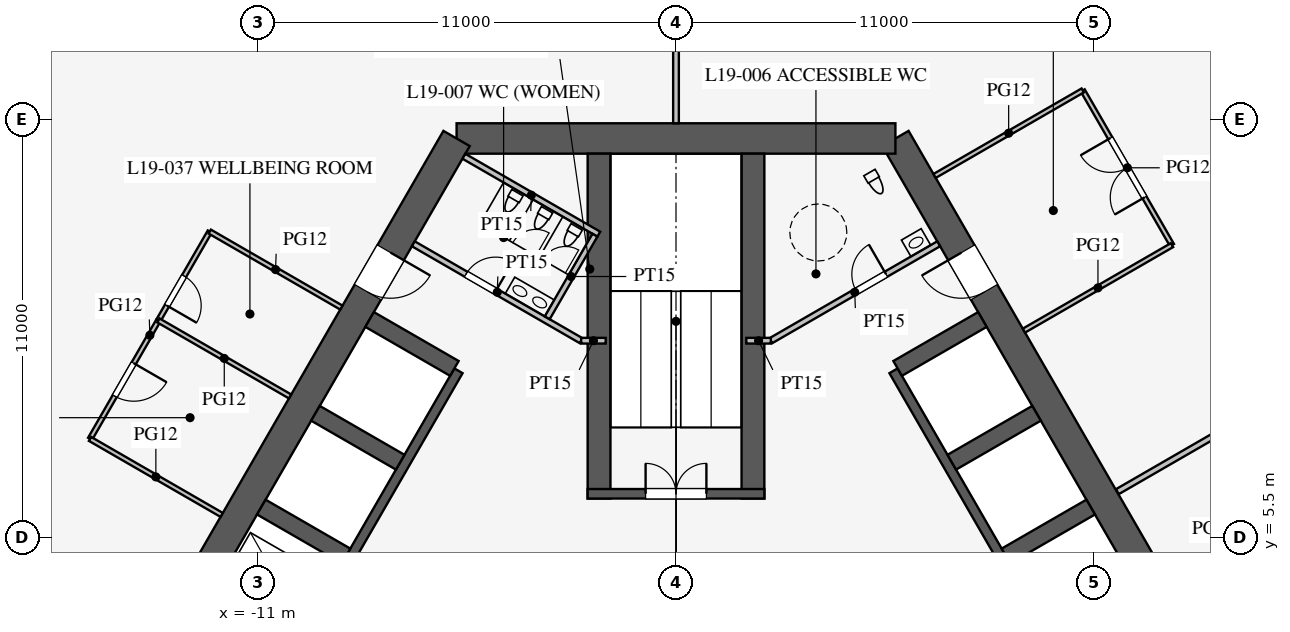
"""IFC4 building model, lengths in metres.
Left out: names, types, materials, properties, quantities, classifications, styles, units other than length and angle.
Written with IfcOpenShell. Run it as: python <this file> out.ifc"""

import sys

from ifc_helpers import new_model, si_unit, direction, frame, frame_2d, origin, place, context, subcontext, project, spatial, rectangle, extrude, element, fill, save


model = new_model("IFC4")
c1 = context("Model", 3, precision=1e-05, world=origin(), true_north=direction((0.0, 1.0)))
c2 = subcontext(c1, "Body", "Model", "MODEL_VIEW")
j1 = project(units=[si_unit("LENGTHUNIT", "METRE"), si_unit("PLANEANGLEUNIT", "RADIAN")], contexts=[c1])
p1 = place(None, origin())
s1 = spatial("IfcSite", under=j1, at=p1, CompositionType="ELEMENT")
p2 = place(p1, origin())
s2 = spatial("IfcBuilding", under=s1, at=p2, CompositionType="ELEMENT")
p3 = place(p2, frame((0.0, 0.0, 83.7)))
s3 = spatial("IfcBuildingStorey", under=s2, at=p3, CompositionType="ELEMENT", Elevation=83.7)
p4 = place(p3, frame((16.743, -3.0, 0.0), z_axis=(0.0, 0.0, 1.0), x_axis=(-0.500002442456, 0.866023993627, 0.0)))
e1 = element("IfcWall", 1, at=p4, inside=s3, PredefinedType="SHEAR", context=c2, shape_type="SweptSolid", body=[
    extrude(rectangle(XDim=21.939, YDim=0.8, at=frame_2d((10.97, 0.0))), origin(), (0.0, 0.0, 1.0), 4.2),
])
p5 = place(p4, frame((17.27, 0.0, 0.0)))
e2 = element("IfcOpeningElement", 2, at=p5, cuts=e1, PredefinedType="OPENING", context=c2, shape_type="SweptSolid", body=[
    extrude(rectangle(XDim=1.2, YDim=2.1, at=frame_2d((0.6, 1.05))), frame((0.0, 0.41, 0.0), z_axis=(0.0, -1.0, 0.0), x_axis=(1.0, 0.0, 0.0)), (0.0, 0.0, 1.0), 0.82),
])
p6 = place(p4, frame((3.47, 0.0, 0.0)))
e3 = element("IfcOpeningElement", 3, at=p6, cuts=e1, PredefinedType="OPENING", context=c2, shape_type="SweptSolid", body=[
    extrude(rectangle(XDim=1.2, YDim=2.1, at=frame_2d((0.6, 1.05))), frame((0.0, 0.41, 0.0), z_axis=(0.0, -1.0, 0.0), x_axis=(1.0, 0.0, 0.0)), (0.0, 0.0, 1.0), 0.82),
])
p7 = place(p3, frame((5.773, 16.0, 0.0), z_axis=(0.0, 0.0, 1.0), x_axis=(-1.0, 0.0, 0.0)))
e4 = element("IfcWall", 4, at=p7, inside=s3, PredefinedType="SHEAR", context=c2, shape_type="SweptSolid", body=[
    extrude(rectangle(XDim=11.547, YDim=0.8, at=frame_2d((5.773, 0.0))), origin(), (0.0, 0.0, 1.0), 4.2),
])
p8 = place(p3, frame((-5.773, 16.0, 0.0), z_axis=(0.0, 0.0, 1.0), x_axis=(-0.500002442456, -0.866023993627, 0.0)))
e5 = element("IfcWall", 5, at=p8, inside=s3, PredefinedType="SHEAR", context=c2, shape_type="SweptSolid", body=[
    extrude(rectangle(XDim=21.939, YDim=0.8, at=frame_2d((10.97, 0.0))), origin(), (0.0, 0.0, 1.0), 4.2),
])
p9 = place(p8, frame((17.27, 0.0, 0.0)))
e6 = element("IfcOpeningElement", 6, at=p9, cuts=e5, PredefinedType="OPENING", context=c2, shape_type="SweptSolid", body=[
    extrude(rectangle(XDim=1.2, YDim=2.1, at=frame_2d((0.6, 1.05))), frame((0.0, 0.41, 0.0), z_axis=(0.0, -1.0, 0.0), x_axis=(1.0, 0.0, 0.0)), (0.0, 0.0, 1.0), 0.82),
])
p10 = place(p8, frame((3.47, 0.0, 0.0)))
e7 = element("IfcOpeningElement", 7, at=p10, cuts=e5, PredefinedType="OPENING", context=c2, shape_type="SweptSolid", body=[
    extrude(rectangle(XDim=1.2, YDim=2.1, at=frame_2d((0.6, 1.05))), frame((0.0, 0.41, 0.0), z_axis=(0.0, -1.0, 0.0), x_axis=(1.0, 0.0, 0.0)), (0.0, 0.0, 1.0), 0.82),
])
p11 = place(p3, frame((11.424, 0.014, 0.0), z_axis=(0.0, 0.0, 1.0), x_axis=(-0.500001763848, 0.866024385424, 0.0)))
e8 = element("IfcWall", 8, at=p11, inside=s3, PredefinedType="SHEAR", context=c2, shape_type="SweptSolid", body=[
    extrude(rectangle(XDim=11.4, YDim=0.25, at=frame_2d((5.7, 0.0))), origin(), (0.0, 0.0, 1.0), 4.2),
])
for number, where, z_axis, x_axis in (
    (9, (8.682, 5.012, 0.0), (0.0, 0.0, 1.0), (0.866, 0.5, 0.0)),
    (10, (7.257, 7.481, 0.0), (0.0, 0.0, 1.0), (0.866, 0.5, 0.0)),
):
    element("IfcWall", number, at=place(p3, frame(where, z_axis=z_axis, x_axis=x_axis)), inside=s3, PredefinedType="SHEAR", context=c2, shape_type="SweptSolid", body=[
        extrude(rectangle(XDim=2.575, YDim=0.45, at=frame_2d((1.288, 0.0))), origin(), (0.0, 0.0, 1.0), 4.2),
    ])
p12 = place(p3, frame((5.832, 9.949, 0.0), z_axis=(0.0, 0.0, 1.0), x_axis=(0.866029291668, 0.499993265928, 0.0)))
e11 = element("IfcWall", 11, at=p12, inside=s3, PredefinedType="SHEAR", context=c2, shape_type="SweptSolid", body=[
    extrude(rectangle(XDim=2.575, YDim=0.45, at=frame_2d((1.288, 0.0))), origin(), (0.0, 0.0, 1.0), 4.2),
])
p13 = place(p3, frame((-5.724, 9.886, 0.0), z_axis=(0.0, 0.0, 1.0), x_axis=(-0.500001763848, -0.866024385424, 0.0)))
e12 = element("IfcWall", 12, at=p13, inside=s3, PredefinedType="SHEAR", context=c2, shape_type="SweptSolid", body=[
    extrude(rectangle(XDim=11.4, YDim=0.25, at=frame_2d((5.7, 0.0))), origin(), (0.0, 0.0, 1.0), 4.2),
])
p14 = place(p13, frame((6.525, 0.0, 0.0)))
e13 = element("IfcOpeningElement", 13, at=p14, cuts=e12, PredefinedType="OPENING", context=c2, shape_type="SweptSolid", body=[
    extrude(rectangle(XDim=1.2, YDim=2.2, at=frame_2d((0.6, 1.1))), frame((0.0, 0.135, 0.0), z_axis=(0.0, -1.0, 0.0), x_axis=(1.0, 0.0, 0.0)), (0.0, 0.0, 1.0), 0.27),
])
p15 = place(p13, frame((9.375, 0.0, 0.0)))
e14 = element("IfcOpeningElement", 14, at=p15, cuts=e12, PredefinedType="OPENING", context=c2, shape_type="SweptSolid", body=[
    extrude(rectangle(XDim=1.2, YDim=2.2, at=frame_2d((0.6, 1.1))), frame((0.0, 0.135, 0.0), z_axis=(0.0, -1.0, 0.0), x_axis=(1.0, 0.0, 0.0)), (0.0, 0.0, 1.0), 0.27),
])
p16 = place(p3, frame((-5.832, 9.949, 0.0), z_axis=(0.0, 0.0, 1.0), x_axis=(-0.866029291668, 0.499993265928, 0.0)))
e15 = element("IfcWall", 15, at=p16, inside=s3, PredefinedType="SHEAR", context=c2, shape_type="SweptSolid", body=[
    extrude(rectangle(XDim=2.575, YDim=0.45, at=frame_2d((1.288, 0.0))), origin(), (0.0, 0.0, 1.0), 4.2),
])
for number, where, z_axis, x_axis in (
    (16, (-7.257, 7.481, 0.0), (0.0, 0.0, 1.0), (-0.866, 0.5, 0.0)),
    (17, (-8.682, 5.012, 0.0), (0.0, 0.0, 1.0), (-0.866, 0.5, 0.0)),
):
    element("IfcWall", number, at=place(p3, frame(where, z_axis=z_axis, x_axis=x_axis)), inside=s3, PredefinedType="SHEAR", context=c2, shape_type="SweptSolid", body=[
        extrude(rectangle(XDim=2.575, YDim=0.45, at=frame_2d((1.288, 0.0))), origin(), (0.0, 0.0, 1.0), 4.2),
    ])
for number, where, z_axis, x_axis in (
    (18, (2.025, 6.525, 0.0), (0.0, 0.0, 1.0), (0.0, 1.0, 0.0)),
    (19, (-2.025, 6.525, 0.0), (0.0, 0.0, 1.0), (0.0, 1.0, 0.0)),
):
    element("IfcWall", number, at=place(p3, frame(where, z_axis=z_axis, x_axis=x_axis)), inside=s3, PredefinedType="SHEAR", context=c2, shape_type="SweptSolid", body=[
        extrude(rectangle(XDim=9.075, YDim=0.6, at=frame_2d((4.538, 0.0))), origin(), (0.0, 0.0, 1.0), 4.2),
    ])
p17 = place(p3, frame((2.325, 6.65, 0.0), z_axis=(0.0, 0.0, 1.0), x_axis=(-1.0, 0.0, 0.0)))
e20 = element("IfcWall", 20, at=p17, inside=s3, PredefinedType="SHEAR", context=c2, shape_type="SweptSolid", body=[
    extrude(rectangle(XDim=4.65, YDim=0.25, at=frame_2d((2.325, 0.0))), origin(), (0.0, 0.0, 1.0), 4.2),
])
p18 = place(p17, frame((1.525, 0.0, 0.0)))
e21 = element("IfcOpeningElement", 21, at=p18, cuts=e20, PredefinedType="OPENING", context=c2, shape_type="SweptSolid", body=[
    extrude(rectangle(XDim=1.6, YDim=2.1, at=frame_2d((0.8, 1.05))), frame((0.0, 0.135, 0.0), z_axis=(0.0, -1.0, 0.0), x_axis=(1.0, 0.0, 0.0)), (0.0, 0.0, 1.0), 0.27),
])
p19 = place(p3, frame((2.495, 10.678, 0.0), z_axis=(0.0, 0.0, 1.0), x_axis=(0.86602216432, 0.500005610874, 0.0)))
e22 = element("IfcWall", 22, at=p19, inside=s3, PredefinedType="PARTITIONING", context=c2, shape_type="SweptSolid", body=[
    extrude(rectangle(XDim=5.1, YDim=0.15, at=frame_2d((2.55, 0.0))), origin(), (0.0, 0.0, 1.0), 4.0),
])
p20 = place(p19, frame((2.6, 0.0, 0.0)))
e23 = element("IfcOpeningElement", 23, at=p20, cuts=e22, PredefinedType="OPENING", context=c2, shape_type="SweptSolid", body=[
    extrude(rectangle(XDim=0.9, YDim=2.1, at=frame_2d((0.45, 1.05))), frame((0.0, 0.085, 0.0), z_axis=(0.0, -1.0, 0.0), x_axis=(1.0, 0.0, 0.0)), (0.0, 0.0, 1.0), 0.17),
])
p21 = place(p3, frame((-2.495, 10.678, 0.0), z_axis=(0.0, 0.0, 1.0), x_axis=(-0.86602216432, 0.500005610874, 0.0)))
e24 = element("IfcWall", 24, at=p21, inside=s3, PredefinedType="PARTITIONING", context=c2, shape_type="SweptSolid", body=[
    extrude(rectangle(XDim=5.1, YDim=0.15, at=frame_2d((2.55, 0.0))), origin(), (0.0, 0.0, 1.0), 4.0),
])
p22 = place(p21, frame((2.6, 0.0, 0.0)))
e25 = element("IfcOpeningElement", 25, at=p22, cuts=e24, PredefinedType="OPENING", context=c2, shape_type="SweptSolid", body=[
    extrude(rectangle(XDim=0.9, YDim=2.1, at=frame_2d((0.45, 1.05))), frame((0.0, 0.085, 0.0), z_axis=(0.0, -1.0, 0.0), x_axis=(1.0, 0.0, 0.0)), (0.0, 0.0, 1.0), 0.17),
])
for number, where, z_axis, x_axis in (
    (26, (2.495, 10.678, 0.0), (0.0, 0.0, 1.0), (-1.0, 0.0, 0.0)),
    (27, (-2.495, 10.678, 0.0), (0.0, 0.0, 1.0), (1.0, 0.0, 0.0)),
):
    element("IfcWall", number, at=place(p3, frame(where, z_axis=z_axis, x_axis=x_axis)), inside=s3, PredefinedType="PARTITIONING", context=c2, shape_type="SweptSolid", body=[
        extrude(rectangle(XDim=0.645, YDim=0.15, at=frame_2d((0.323, 0.0))), origin(), (0.0, 0.0, 1.0), 4.0),
    ])
p23 = place(p3, frame((-2.031, 13.482, 0.0), z_axis=(0.0, 0.0, 1.0), x_axis=(-0.866050731258, 0.499956128963, 0.0)))
e28 = element("IfcWall", 28, at=p23, inside=s3, PredefinedType="PARTITIONING", context=c2, shape_type="SweptSolid", body=[
    extrude(rectangle(XDim=4.1, YDim=0.15, at=frame_2d((2.05, 0.0))), origin(), (0.0, 0.0, 1.0), 4.0),
])
p24 = place(p3, frame((-3.389, 11.281, 0.0), z_axis=(0.0, 0.0, 1.0), x_axis=(0.499989096993, 0.866031698547, 0.0)))
e29 = element("IfcWall", 29, at=p24, inside=s3, PredefinedType="PARTITIONING", context=c2, shape_type="SweptSolid", body=[
    extrude(rectangle(XDim=2.51, YDim=0.15, at=frame_2d((1.255, 0.0))), origin(), (0.0, 0.0, 1.0), 4.0),
])
p25 = place(p3, frame((0.0, 16.4, 0.0), z_axis=(0.0, 0.0, 1.0), x_axis=(0.0, 1.0, 0.0)))
e30 = element("IfcWall", 30, at=p25, inside=s3, PredefinedType="PARTITIONING", context=c2, shape_type="SweptSolid", body=[
    extrude(rectangle(XDim=18.25, YDim=0.15, at=frame_2d((9.125, 0.0))), origin(), (0.0, 0.0, 1.0), 2.3),
])
p26 = place(p3, frame((11.613, 6.705, 0.0), z_axis=(0.0, 0.0, 1.0), x_axis=(0.866029791586, 0.499992400027, 0.0)))
e31 = element("IfcWall", 31, at=p26, inside=s3, PredefinedType="PARTITIONING", context=c2, shape_type="SweptSolid", body=[
    extrude(rectangle(XDim=12.709, YDim=0.15, at=frame_2d((6.354, 0.0))), origin(), (0.0, 0.0, 1.0), 2.6),
])
p27 = place(p3, frame((13.052, 13.194, 0.0), z_axis=(0.0, 0.0, 1.0), x_axis=(-0.499977259774, 0.866038532462, 0.0)))
e32 = element("IfcWall", 32, at=p27, inside=s3, PredefinedType="PARTITIONING", context=c2, shape_type="SweptSolid", body=[
    extrude(rectangle(XDim=4.7, YDim=0.12, at=frame_2d((2.35, 0.0))), origin(), (0.0, 0.0, 1.0), 2.9),
])
p28 = place(p27, frame((1.45, 0.0, 0.15)))
e33 = element("IfcOpeningElement", 33, at=p28, cuts=e32, PredefinedType="OPENING", context=c2, shape_type="SweptSolid", body=[
    extrude(rectangle(XDim=1.8, YDim=2.1, at=frame_2d((0.9, 1.05))), frame((0.0, 0.07, 0.0), z_axis=(0.0, -1.0, 0.0), x_axis=(1.0, 0.0, 0.0)), (0.0, 0.0, 1.0), 0.14),
])
p29 = place(p3, frame((9.155, 10.944, 0.0), z_axis=(0.0, 0.0, 1.0), x_axis=(0.866017533419, 0.500013631625, 0.0)))
e34 = element("IfcWall", 34, at=p29, inside=s3, PredefinedType="PARTITIONING", context=c2, shape_type="SweptSolid", body=[
    extrude(rectangle(XDim=4.5, YDim=0.12, at=frame_2d((2.25, 0.0))), origin(), (0.0, 0.0, 1.0), 2.9),
])
p30 = place(p3, frame((6.805, 15.014, 0.0), z_axis=(0.0, 0.0, 1.0), x_axis=(0.866031096941, 0.499990139034, 0.0)))
e35 = element("IfcWall", 35, at=p30, inside=s3, PredefinedType="PARTITIONING", context=c2, shape_type="SweptSolid", body=[
    extrude(rectangle(XDim=4.5, YDim=0.12, at=frame_2d((2.25, 0.0))), origin(), (0.0, 0.0, 1.0), 2.9),
])
p31 = place(p3, frame((13.205, 3.929, 0.0), z_axis=(0.0, 0.0, 1.0), x_axis=(0.866026010844, 0.49999894854, 0.0)))
e36 = element("IfcWall", 36, at=p31, inside=s3, PredefinedType="PARTITIONING", context=c2, shape_type="SweptSolid", body=[
    extrude(rectangle(XDim=4.0, YDim=0.12, at=frame_2d((2.0, 0.0))), origin(), (0.0, 0.0, 1.0), 2.9),
])
p32 = place(p3, frame((-13.619, 11.211, 0.0), z_axis=(0.0, 0.0, 1.0), x_axis=(-0.500012057535, -0.866018442252, 0.0)))
e37 = element("IfcWall", 37, at=p32, inside=s3, PredefinedType="PARTITIONING", context=c2, shape_type="SweptSolid", body=[
    extrude(rectangle(XDim=3.6, YDim=0.12, at=frame_2d((1.8, 0.0))), origin(), (0.0, 0.0, 1.0), 2.9),
])
p33 = place(p32, frame((1.3, 0.0, 0.15)))
e38 = element("IfcOpeningElement", 38, at=p33, cuts=e37, PredefinedType="OPENING", context=c2, shape_type="SweptSolid", body=[
    extrude(rectangle(XDim=1.0, YDim=2.1, at=frame_2d((0.5, 1.05))), frame((0.0, 0.07, 0.0), z_axis=(0.0, -1.0, 0.0), x_axis=(1.0, 0.0, 0.0)), (0.0, 0.0, 1.0), 0.14),
])
p34 = place(p3, frame((-12.269, 13.55, 0.0), z_axis=(0.0, 0.0, 1.0), x_axis=(-0.50000943426, -0.866019956843, 0.0)))
e39 = element("IfcWall", 39, at=p34, inside=s3, PredefinedType="PARTITIONING", context=c2, shape_type="SweptSolid", body=[
    extrude(rectangle(XDim=2.7, YDim=0.12, at=frame_2d((1.35, 0.0))), origin(), (0.0, 0.0, 1.0), 2.9),
])
p35 = place(p34, frame((1.35, 0.0, 0.15)))
e40 = element("IfcOpeningElement", 40, at=p35, cuts=e39, PredefinedType="OPENING", context=c2, shape_type="SweptSolid", body=[
    extrude(rectangle(XDim=0.9, YDim=2.1, at=frame_2d((0.45, 1.05))), frame((0.0, 0.07, 0.0), z_axis=(0.0, -1.0, 0.0), x_axis=(1.0, 0.0, 0.0)), (0.0, 0.0, 1.0), 0.14),
])
for number, where, z_axis, x_axis in (
    (41, (-11.955, 6.094, 0.0), (0.0, 0.0, 1.0), (-0.866, 0.5, 0.0)),
    (42, (-10.155, 9.211, 0.0), (0.0, 0.0, 1.0), (-0.866, 0.5, 0.0)),
    (43, (-8.805, 11.55, 0.0), (0.0, 0.0, 1.0), (-0.866, 0.5, 0.0)),
):
    element("IfcWall", number, at=place(p3, frame(where, z_axis=z_axis, x_axis=x_axis)), inside=s3, PredefinedType="PARTITIONING", context=c2, shape_type="SweptSolid", body=[
        extrude(rectangle(XDim=4.0, YDim=0.12, at=frame_2d((2.0, 0.0))), origin(), (0.0, 0.0, 1.0), 2.9),
    ])
p36 = place(p20, origin())
e44 = element("IfcDoor", 44, at=p36, inside=s3, OperationType="SINGLE_SWING_RIGHT", PredefinedType="DOOR", context=c2, shape_type="SweptSolid", body=[
    extrude(rectangle(XDim=0.9, YDim=2.1, at=frame_2d((0.45, 1.05))), frame((0.0, 0.025, 0.0), z_axis=(0.0, -1.0, 0.0), x_axis=(1.0, 0.0, 0.0)), (0.0, 0.0, 1.0), 0.05),
])
fill(e23, e44)
p37 = place(p22, frame((0.9, 0.0, 0.0), z_axis=(0.0, 0.0, 1.0), x_axis=(-1.0, 0.0, 0.0)))
e45 = element("IfcDoor", 45, at=p37, inside=s3, OperationType="SINGLE_SWING_RIGHT", PredefinedType="DOOR", context=c2, shape_type="SweptSolid", body=[
    extrude(rectangle(XDim=0.9, YDim=2.1, at=frame_2d((0.45, 1.05))), frame((0.0, 0.025, 0.0), z_axis=(0.0, -1.0, 0.0), x_axis=(1.0, 0.0, 0.0)), (0.0, 0.0, 1.0), 0.05),
])
fill(e25, e45)
p38 = place(p18, frame((1.6, 0.0, 0.0), z_axis=(0.0, 0.0, 1.0), x_axis=(-1.0, 0.0, 0.0)))
e46 = element("IfcDoor", 46, at=p38, inside=s3, OperationType="DOUBLE_DOOR_SINGLE_SWING", PredefinedType="DOOR", context=c2, shape_type="SweptSolid", body=[
    extrude(rectangle(XDim=1.6, YDim=2.1, at=frame_2d((0.8, 1.05))), frame((0.0, 0.025, 0.0), z_axis=(0.0, -1.0, 0.0), x_axis=(1.0, 0.0, 0.0)), (0.0, 0.0, 1.0), 0.05),
])
fill(e21, e46)
p39 = place(p5, origin())
e47 = element("IfcDoor", 47, at=p39, inside=s3, OperationType="SINGLE_SWING_RIGHT", PredefinedType="DOOR", context=c2, shape_type="SweptSolid", body=[
    extrude(rectangle(XDim=1.2, YDim=2.1, at=frame_2d((0.6, 1.05))), frame((0.0, 0.025, 0.0), z_axis=(0.0, -1.0, 0.0), x_axis=(1.0, 0.0, 0.0)), (0.0, 0.0, 1.0), 0.05),
])
fill(e2, e47)
p40 = place(p10, origin())
e48 = element("IfcDoor", 48, at=p40, inside=s3, OperationType="SINGLE_SWING_LEFT", PredefinedType="DOOR", context=c2, shape_type="SweptSolid", body=[
    extrude(rectangle(XDim=1.2, YDim=2.1, at=frame_2d((0.6, 1.05))), frame((0.0, 0.025, 0.0), z_axis=(0.0, -1.0, 0.0), x_axis=(1.0, 0.0, 0.0)), (0.0, 0.0, 1.0), 0.05),
])
fill(e7, e48)
p41 = place(p28, origin())
e49 = element("IfcDoor", 49, at=p41, inside=s3, OperationType="DOUBLE_DOOR_SINGLE_SWING", PredefinedType="DOOR", context=c2, shape_type="SweptSolid", body=[
    extrude(rectangle(XDim=1.8, YDim=2.1, at=frame_2d((0.9, 1.05))), frame((0.0, 0.025, 0.0), z_axis=(0.0, -1.0, 0.0), x_axis=(1.0, 0.0, 0.0)), (0.0, 0.0, 1.0), 0.05),
])
fill(e33, e49)
p42 = place(p35, origin())
e50 = element("IfcDoor", 50, at=p42, inside=s3, OperationType="SINGLE_SWING_RIGHT", PredefinedType="DOOR", context=c2, shape_type="SweptSolid", body=[
    extrude(rectangle(XDim=0.9, YDim=2.1, at=frame_2d((0.45, 1.05))), frame((0.0, 0.025, 0.0), z_axis=(0.0, -1.0, 0.0), x_axis=(1.0, 0.0, 0.0)), (0.0, 0.0, 1.0), 0.05),
])
fill(e40, e50)
p43 = place(p33, origin())
e51 = element("IfcDoor", 51, at=p43, inside=s3, OperationType="SINGLE_SWING_LEFT", PredefinedType="DOOR", context=c2, shape_type="SweptSolid", body=[
    extrude(rectangle(XDim=1.0, YDim=2.1, at=frame_2d((0.5, 1.05))), frame((0.0, 0.025, 0.0), z_axis=(0.0, -1.0, 0.0), x_axis=(1.0, 0.0, 0.0)), (0.0, 0.0, 1.0), 0.05),
])
fill(e38, e51)
save(model, sys.argv[1])
